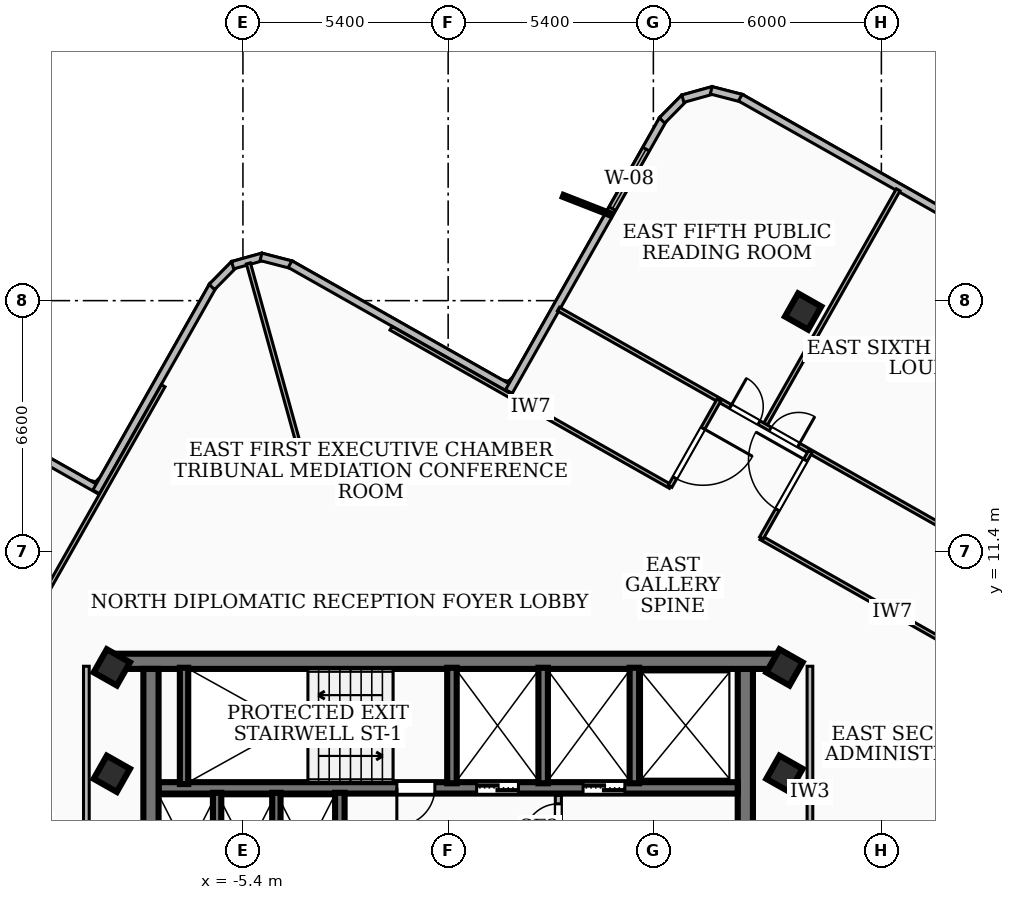
"""IFC4 building model, lengths in metres.
Left out: names, types, materials, properties, quantities, classifications, styles, units other than length and angle.
Written with IfcOpenShell. Run it as: python <this file> out.ifc"""

import sys

from ifc_helpers import new_model, si_unit, direction, frame, frame_2d, origin, origin_2d, place, context, subcontext, project, spatial, rectangle, extrude, element, fill, save


model = new_model("IFC4")
c1 = context("Model", 3, precision=1e-05, world=origin(), true_north=direction((0.0, 1.0)))
c2 = subcontext(c1, "Body", "Model", "MODEL_VIEW")
j1 = project(units=[si_unit("LENGTHUNIT", "METRE"), si_unit("PLANEANGLEUNIT", "RADIAN")], contexts=[c1])
p1 = place(None, origin())
s1 = spatial("IfcSite", under=j1, at=p1, CompositionType="ELEMENT")
p2 = place(p1, origin())
s2 = spatial("IfcBuilding", under=s1, at=p2, CompositionType="ELEMENT")
p3 = place(p2, frame((0.0, 0.0, 278.28)))
s3 = spatial("IfcBuildingStorey", under=s2, at=p3, CompositionType="ELEMENT", Elevation=278.28)
p4 = place(p3, frame((-8.78, 8.51, 0.0), z_axis=(0.0, 0.0, 1.0), x_axis=(1.0, 0.0, 0.0)))
e1 = element("IfcWall", 1, at=p4, inside=s3, PredefinedType="SHEAR", context=c2, shape_type="SweptSolid", body=[
    extrude(rectangle(XDim=17.56, YDim=0.4, at=frame_2d((8.78, 0.0))), origin(), (0.0, 0.0, 1.0), 3.16),
])
for number, where, z_axis, x_axis in (
    (2, (-7.82, 1.95, 0.0), (0.0, 0.0, 1.0), (0.0, 1.0, 0.0)),
    (3, (7.82, 8.31, 0.0), (0.0, 0.0, 1.0), (0.0, -1.0, 0.0)),
):
    element("IfcWall", number, at=place(p3, frame(where, z_axis=z_axis, x_axis=x_axis)), inside=s3, PredefinedType="SHEAR", context=c2, shape_type="SweptSolid", body=[
        extrude(rectangle(XDim=6.36, YDim=0.4, at=frame_2d((3.18, 0.0))), origin(), (0.0, 0.0, 1.0), 3.16),
    ])
p5 = place(p3, frame((7.62, 5.18, 0.0), z_axis=(0.0, 0.0, 1.0), x_axis=(-1.0, 0.0, 0.0)))
e4 = element("IfcWall", 4, at=p5, inside=s3, PredefinedType="SOLIDWALL", context=c2, shape_type="SweptSolid", body=[
    extrude(rectangle(XDim=15.24, YDim=0.3, at=frame_2d((7.62, 0.0))), origin(), (0.0, 0.0, 1.0), 3.16),
])
p6 = place(p5, frame((5.77, 0.0, 0.0)))
e5 = element("IfcOpeningElement", 5, at=p6, cuts=e4, PredefinedType="OPENING", context=c2, shape_type="SweptSolid", body=[
    extrude(rectangle(XDim=1.1, YDim=2.15, at=frame_2d((0.55, 1.075))), frame((0.0, 0.16, 0.0), z_axis=(0.0, -1.0, 0.0), x_axis=(1.0, 0.0, 0.0)), (0.0, 0.0, 1.0), 0.32),
])
p7 = place(p5, frame((2.97, 0.0, 0.0)))
e6 = element("IfcOpeningElement", 6, at=p7, cuts=e4, PredefinedType="OPENING", context=c2, shape_type="SweptSolid", body=[
    extrude(rectangle(XDim=1.1, YDim=2.15, at=frame_2d((0.55, 1.075))), frame((0.0, 0.16, 0.0), z_axis=(0.0, -1.0, 0.0), x_axis=(1.0, 0.0, 0.0)), (0.0, 0.0, 1.0), 0.32),
])
p8 = place(p5, frame((7.97, 0.0, 0.0)))
e7 = element("IfcOpeningElement", 7, at=p8, cuts=e4, PredefinedType="OPENING", context=c2, shape_type="SweptSolid", body=[
    extrude(rectangle(XDim=1.0, YDim=2.1, at=frame_2d((0.5, 1.05))), frame((0.0, 0.16, 0.0), z_axis=(0.0, -1.0, 0.0), x_axis=(1.0, 0.0, 0.0)), (0.0, 0.0, 1.0), 0.32),
])
p9 = place(p3, frame((-6.95, 5.28, 0.0), z_axis=(0.0, 0.0, 1.0), x_axis=(0.0, 1.0, 0.0)))
e8 = element("IfcWall", 8, at=p9, inside=s3, PredefinedType="SOLIDWALL", context=c2, shape_type="SweptSolid", body=[
    extrude(rectangle(XDim=3.06, YDim=0.22, at=frame_2d((1.53, 0.0))), origin(), (0.0, 0.0, 1.0), 3.16),
])
for number, where, z_axis, x_axis in (
    (9, (0.1, 5.3, 0.0), (0.0, 0.0, 1.0), (0.0, 1.0, 0.0)),
    (10, (2.5, 5.3, 0.0), (0.0, 0.0, 1.0), (0.0, 1.0, 0.0)),
    (11, (4.9, 5.3, 0.0), (0.0, 0.0, 1.0), (0.0, 1.0, 0.0)),
):
    element("IfcWall", number, at=place(p3, frame(where, z_axis=z_axis, x_axis=x_axis)), inside=s3, PredefinedType="SOLIDWALL", context=c2, shape_type="SweptSolid", body=[
        extrude(rectangle(XDim=3.04, YDim=0.25, at=frame_2d((1.52, 0.0))), origin(), (0.0, 0.0, 1.0), 3.16),
    ])
p10 = place(p3, frame((-2.85, 1.98, 0.0), z_axis=(0.0, 0.0, 1.0), x_axis=(0.0, 1.0, 0.0)))
e12 = element("IfcWall", 12, at=p10, inside=s3, PredefinedType="SOLIDWALL", context=c2, shape_type="SweptSolid", body=[
    extrude(rectangle(XDim=3.07, YDim=0.25, at=frame_2d((1.535, 0.0))), origin(), (0.0, 0.0, 1.0), 3.16),
])
for number, where, z_axis, x_axis in (
    (13, (-6.08, 1.98, 0.0), (0.0, 0.0, 1.0), (0.0, 1.0, 0.0)),
    (14, (-4.52, 1.98, 0.0), (0.0, 0.0, 1.0), (0.0, 1.0, 0.0)),
):
    element("IfcWall", number, at=place(p3, frame(where, z_axis=z_axis, x_axis=x_axis)), inside=s3, PredefinedType="SOLIDWALL", context=c2, shape_type="SweptSolid", body=[
        extrude(rectangle(XDim=3.07, YDim=0.22, at=frame_2d((1.535, 0.0))), origin(), (0.0, 0.0, 1.0), 3.16),
    ])
for number, where, z_axis, x_axis in (
    (15, (-8.85, 5.55, 0.0), (0.0, 0.0, 1.0), (0.493, 0.87, 0.0)),
    (16, (8.85, 5.55, 0.0), (0.0, 0.0, 1.0), (0.493, 0.87, 0.0)),
    (17, (-8.85, 8.35, 0.0), (0.0, 0.0, 1.0), (0.493, 0.87, 0.0)),
    (18, (8.85, 8.35, 0.0), (0.0, 0.0, 1.0), (0.493, 0.87, 0.0)),
    (19, (9.341, 17.714, 0.0), (0.0, 0.0, 1.0), (0.493, 0.87, 0.0)),
):
    element("IfcColumn", number, at=place(p3, frame(where, z_axis=z_axis, x_axis=x_axis)), inside=s3, PredefinedType="COLUMN", context=c2, shape_type="SweptSolid", body=[
        extrude(rectangle(XDim=0.7, YDim=0.7, at=origin_2d()), origin(), (0.0, 0.0, 1.0), 3.42),
    ])
p11 = place(p3, frame((-12.323, 14.792, 0.0), z_axis=(0.0, 0.0, 1.0), x_axis=(0.870412972764, -0.492322309918, 0.0)))
e20 = element("IfcWall", 20, at=p11, inside=s3, PredefinedType="SOLIDWALL", context=c2, shape_type="SweptSolid", body=[
    extrude(rectangle(XDim=3.642, YDim=0.2, at=frame_2d((1.821, 0.0))), origin(), (0.0, 0.0, 1.0), 3.16),
])
p12 = place(p3, frame((-9.262, 12.968, 0.0), z_axis=(0.0, 0.0, 1.0), x_axis=(0.492583125855, 0.87026539867, 0.0)))
e21 = element("IfcWall", 21, at=p12, inside=s3, PredefinedType="SOLIDWALL", context=c2, shape_type="SweptSolid", body=[
    extrude(rectangle(XDim=6.24, YDim=0.2, at=frame_2d((3.12, 0.0))), origin(), (0.0, 0.0, 1.0), 3.16),
])
p13 = place(p3, frame((-6.218, 18.359, 0.0), z_axis=(0.0, 0.0, 1.0), x_axis=(0.701706468749, 0.712466161804, 0.0)))
e22 = element("IfcWall", 22, at=p13, inside=s3, PredefinedType="SOLIDWALL", context=c2, shape_type="SweptSolid", body=[
    extrude(rectangle(XDim=0.84, YDim=0.2, at=frame_2d((0.42, 0.0))), origin(), (0.0, 0.0, 1.0), 3.16),
])
p14 = place(p3, frame((-5.671, 18.932, 0.0), z_axis=(0.0, 0.0, 1.0), x_axis=(0.963313924885, 0.268377126675, 0.0)))
e23 = element("IfcWall", 23, at=p14, inside=s3, PredefinedType="SOLIDWALL", context=c2, shape_type="SweptSolid", body=[
    extrude(rectangle(XDim=0.824, YDim=0.2, at=frame_2d((0.412, 0.0))), origin(), (0.0, 0.0, 1.0), 3.16),
])
p15 = place(p3, frame((-4.925, 19.152, 0.0), z_axis=(0.0, 0.0, 1.0), x_axis=(0.968015248239, -0.250891369276, 0.0)))
e24 = element("IfcWall", 24, at=p15, inside=s3, PredefinedType="SOLIDWALL", context=c2, shape_type="SweptSolid", body=[
    extrude(rectangle(XDim=0.838, YDim=0.2, at=frame_2d((0.419, 0.0))), origin(), (0.0, 0.0, 1.0), 3.16),
])
p16 = place(p3, frame((-4.16, 18.96, 0.0), z_axis=(0.0, 0.0, 1.0), x_axis=(0.870345588147, -0.492441425139, 0.0)))
e25 = element("IfcWall", 25, at=p16, inside=s3, PredefinedType="SOLIDWALL", context=c2, shape_type="SweptSolid", body=[
    extrude(rectangle(XDim=6.742, YDim=0.2, at=frame_2d((3.371, 0.0))), origin(), (0.0, 0.0, 1.0), 3.16),
])
p17 = place(p3, frame((1.599, 15.609, 0.0), z_axis=(0.0, 0.0, 1.0), x_axis=(0.492609649108, 0.870250385582, 0.0)))
e26 = element("IfcWall", 26, at=p17, inside=s3, PredefinedType="SOLIDWALL", context=c2, shape_type="SweptSolid", body=[
    extrude(rectangle(XDim=8.241, YDim=0.2, at=frame_2d((4.121, 0.0))), origin(), (0.0, 0.0, 1.0), 3.16),
])
p18 = place(p17, frame((5.528, 0.0, 0.85)))
e27 = element("IfcOpeningElement", 27, at=p18, cuts=e26, PredefinedType="OPENING", context=c2, shape_type="SweptSolid", body=[
    extrude(rectangle(XDim=1.8, YDim=1.8, at=frame_2d((0.9, 0.9))), frame((0.0, 0.11, 0.0), z_axis=(0.0, -1.0, 0.0), x_axis=(1.0, 0.0, 0.0)), (0.0, 0.0, 1.0), 0.22),
])
p19 = place(p3, frame((5.629, 22.741, 0.0), z_axis=(0.0, 0.0, 1.0), x_axis=(0.701706468749, 0.712466161804, 0.0)))
e28 = element("IfcWall", 28, at=p19, inside=s3, PredefinedType="SOLIDWALL", context=c2, shape_type="SweptSolid", body=[
    extrude(rectangle(XDim=0.84, YDim=0.2, at=frame_2d((0.42, 0.0))), origin(), (0.0, 0.0, 1.0), 3.16),
])
p20 = place(p3, frame((6.176, 23.314, 0.0), z_axis=(0.0, 0.0, 1.0), x_axis=(0.963390474438, 0.268102207677, 0.0)))
e29 = element("IfcWall", 29, at=p20, inside=s3, PredefinedType="SOLIDWALL", context=c2, shape_type="SweptSolid", body=[
    extrude(rectangle(XDim=0.824, YDim=0.2, at=frame_2d((0.412, 0.0))), origin(), (0.0, 0.0, 1.0), 3.16),
])
p21 = place(p3, frame((6.922, 23.534, 0.0), z_axis=(0.0, 0.0, 1.0), x_axis=(0.968067673617, -0.250689009127, 0.0)))
e30 = element("IfcWall", 30, at=p21, inside=s3, PredefinedType="SOLIDWALL", context=c2, shape_type="SweptSolid", body=[
    extrude(rectangle(XDim=0.838, YDim=0.2, at=frame_2d((0.419, 0.0))), origin(), (0.0, 0.0, 1.0), 3.16),
])
p22 = place(p3, frame((7.687, 23.342, 0.0), z_axis=(0.0, 0.0, 1.0), x_axis=(0.870205552017, -0.49268884424, 0.0)))
e31 = element("IfcWall", 31, at=p22, inside=s3, PredefinedType="SOLIDWALL", context=c2, shape_type="SweptSolid", body=[
    extrude(rectangle(XDim=10.124, YDim=0.2, at=frame_2d((5.062, 0.0))), origin(), (0.0, 0.0, 1.0), 3.16),
])
p23 = place(p22, frame((6.997, 0.0, 0.85)))
e32 = element("IfcOpeningElement", 32, at=p23, cuts=e31, PredefinedType="OPENING", context=c2, shape_type="SweptSolid", body=[
    extrude(rectangle(XDim=1.8, YDim=1.6, at=frame_2d((0.9, 0.8))), frame((0.0, 0.11, 0.0), z_axis=(0.0, -1.0, 0.0), x_axis=(1.0, 0.0, 0.0)), (0.0, 0.0, 1.0), 0.22),
])
p24 = place(p3, frame((2.9, 2.04, 0.0), z_axis=(0.0, 0.0, 1.0), x_axis=(0.0, 1.0, 0.0)))
e33 = element("IfcWall", 33, at=p24, inside=s3, PredefinedType="PARTITIONING", context=c2, shape_type="SweptSolid", body=[
    extrude(rectangle(XDim=2.94, YDim=0.16, at=frame_2d((1.47, 0.0))), origin(), (0.0, 0.0, 1.0), 2.39),
])
p25 = place(p24, frame((1.82, 0.0, 0.0)))
e34 = element("IfcOpeningElement", 34, at=p25, cuts=e33, PredefinedType="OPENING", context=c2, shape_type="SweptSolid", body=[
    extrude(rectangle(XDim=0.9, YDim=2.06, at=frame_2d((0.45, 1.03))), frame((0.0, 0.09, 0.0), z_axis=(0.0, -1.0, 0.0), x_axis=(1.0, 0.0, 0.0)), (0.0, 0.0, 1.0), 0.18),
])
p26 = place(p3, frame((-9.52, 1.75, 0.0), z_axis=(0.0, 0.0, 1.0), x_axis=(0.0, 1.0, 0.0)))
e35 = element("IfcWall", 35, at=p26, inside=s3, PredefinedType="PARTITIONING", context=c2, shape_type="SweptSolid", body=[
    extrude(rectangle(XDim=6.63, YDim=0.15, at=frame_2d((3.315, 0.0))), origin(), (0.0, 0.0, 1.0), 2.53),
])
p27 = place(p3, frame((9.52, 1.75, 0.0), z_axis=(0.0, 0.0, 1.0), x_axis=(0.0, 1.0, 0.0)))
e36 = element("IfcWall", 36, at=p27, inside=s3, PredefinedType="PARTITIONING", context=c2, shape_type="SweptSolid", body=[
    extrude(rectangle(XDim=6.63, YDim=0.15, at=frame_2d((3.315, 0.0))), origin(), (0.0, 0.0, 1.0), 3.16),
])
p28 = place(p3, frame((-3.75, 13.54, 0.0), z_axis=(0.0, 0.0, 1.0), x_axis=(-0.266822842302, 0.963745594452, 0.0)))
e37 = element("IfcWall", 37, at=p28, inside=s3, PredefinedType="PARTITIONING", context=c2, shape_type="SweptSolid", body=[
    extrude(rectangle(XDim=5.645, YDim=0.11, at=frame_2d((2.822, 0.0))), origin(), (0.0, 0.0, 1.0), 3.16),
])
p29 = place(p3, frame((11.3, 3.13, 0.0), z_axis=(0.0, 0.0, 1.0), x_axis=(0.963747113025, 0.26681735726, 0.0)))
e38 = element("IfcWall", 38, at=p29, inside=s3, PredefinedType="PARTITIONING", context=c2, shape_type="SweptSolid", body=[
    extrude(rectangle(XDim=7.969, YDim=0.11, at=frame_2d((3.984, 0.0))), origin(), (0.0, 0.0, 1.0), 3.16),
])
p30 = place(p3, frame((5.849, 13.11, 0.0), z_axis=(0.0, 0.0, 1.0), x_axis=(-0.870169207172, 0.49275303235, 0.0)))
e39 = element("IfcWall", 39, at=p30, inside=s3, PredefinedType="PARTITIONING", context=c2, shape_type="SweptSolid", body=[
    extrude(rectangle(XDim=8.45, YDim=0.11, at=frame_2d((4.225, 0.0))), origin(), (0.0, 0.0, 1.0), 3.16),
])
p31 = place(p3, frame((15.152, 7.843, 0.0), z_axis=(0.0, 0.0, 1.0), x_axis=(-0.87023152106, 0.492642973921, 0.0)))
e40 = element("IfcWall", 40, at=p31, inside=s3, PredefinedType="PARTITIONING", context=c2, shape_type="SweptSolid", body=[
    extrude(rectangle(XDim=7.951, YDim=0.11, at=frame_2d((3.976, 0.0))), origin(), (0.0, 0.0, 1.0), 2.53),
])
p32 = place(p3, frame((7.126, 15.386, 0.0), z_axis=(0.0, 0.0, 1.0), x_axis=(-0.492719860856, -0.870187990447, 0.0)))
e41 = element("IfcWall", 41, at=p32, inside=s3, PredefinedType="PARTITIONING", context=c2, shape_type="SweptSolid", body=[
    extrude(rectangle(XDim=2.61, YDim=0.11, at=frame_2d((1.305, 0.0))), origin(), (0.0, 0.0, 1.0), 3.16),
])
p33 = place(p32, frame((0.855, 0.0, 0.0)))
e42 = element("IfcOpeningElement", 42, at=p33, cuts=e41, PredefinedType="OPENING", context=c2, shape_type="SweptSolid", body=[
    extrude(rectangle(XDim=1.5, YDim=2.12, at=frame_2d((0.75, 1.06))), frame((0.0, 0.065, 0.0), z_axis=(0.0, -1.0, 0.0), x_axis=(1.0, 0.0, 0.0)), (0.0, 0.0, 1.0), 0.13),
])
p34 = place(p3, frame((8.242, 11.755, 0.0), z_axis=(0.0, 0.0, 1.0), x_axis=(0.492790693409, 0.870147879667, 0.0)))
e43 = element("IfcWall", 43, at=p34, inside=s3, PredefinedType="PARTITIONING", context=c2, shape_type="SweptSolid", body=[
    extrude(rectangle(XDim=2.61, YDim=0.11, at=frame_2d((1.305, 0.0))), origin(), (0.0, 0.0, 1.0), 2.53),
])
p35 = place(p34, frame((0.855, 0.0, 0.0)))
e44 = element("IfcOpeningElement", 44, at=p35, cuts=e43, PredefinedType="OPENING", context=c2, shape_type="SweptSolid", body=[
    extrude(rectangle(XDim=1.5, YDim=2.12, at=frame_2d((0.75, 1.06))), frame((0.0, 0.065, 0.0), z_axis=(0.0, -1.0, 0.0), x_axis=(1.0, 0.0, 0.0)), (0.0, 0.0, 1.0), 0.13),
])
p36 = place(p3, frame((8.357, 14.758, 0.0), z_axis=(0.0, 0.0, 1.0), x_axis=(0.492600685366, 0.870255459493, 0.0)))
e45 = element("IfcWall", 45, at=p36, inside=s3, PredefinedType="PARTITIONING", context=c2, shape_type="SweptSolid", body=[
    extrude(rectangle(XDim=7.075, YDim=0.11, at=frame_2d((3.538, 0.0))), origin(), (0.0, 0.0, 1.0), 2.53),
])
p37 = place(p3, frame((2.902, 17.778, 0.0), z_axis=(0.0, 0.0, 1.0), x_axis=(0.870194117035, -0.492709040588, 0.0)))
e46 = element("IfcWall", 46, at=p37, inside=s3, PredefinedType="PARTITIONING", context=c2, shape_type="SweptSolid", body=[
    extrude(rectangle(XDim=12.969, YDim=0.11, at=frame_2d((6.485, 0.0))), origin(), (0.0, 0.0, 1.0), 2.53),
])
p38 = place(p37, frame((6.405, 0.0, 0.0)))
e47 = element("IfcOpeningElement", 47, at=p38, cuts=e46, PredefinedType="OPENING", context=c2, shape_type="SweptSolid", body=[
    extrude(rectangle(XDim=0.86, YDim=2.04, at=frame_2d((0.43, 1.02))), frame((0.0, 0.065, 0.0), z_axis=(0.0, -1.0, 0.0), x_axis=(1.0, 0.0, 0.0)), (0.0, 0.0, 1.0), 0.13),
])
p39 = place(p37, frame((5.205, 0.0, 0.0)))
e48 = element("IfcOpeningElement", 48, at=p39, cuts=e46, PredefinedType="OPENING", context=c2, shape_type="SweptSolid", body=[
    extrude(rectangle(XDim=0.86, YDim=2.04, at=frame_2d((0.43, 1.02))), frame((0.0, 0.065, 0.0), z_axis=(0.0, -1.0, 0.0), x_axis=(1.0, 0.0, 0.0)), (0.0, 0.0, 1.0), 0.13),
])
p40 = place(p3, frame((-17.619, -2.113, 0.0), z_axis=(0.0, 0.0, 1.0), x_axis=(0.492746831558, 0.870172718482, 0.0)))
e49 = element("IfcWall", 49, at=p40, inside=s3, PredefinedType="PARTITIONING", context=c2, shape_type="SweptSolid", body=[
    extrude(rectangle(XDim=20.54, YDim=0.11, at=frame_2d((10.27, 0.0))), origin(), (0.0, 0.0, 1.0), 2.53),
])
p41 = place(p40, frame((11.36, 0.0, 0.0)))
e50 = element("IfcOpeningElement", 50, at=p41, cuts=e49, PredefinedType="OPENING", context=c2, shape_type="SweptSolid", body=[
    extrude(rectangle(XDim=0.86, YDim=2.04, at=frame_2d((0.43, 1.02))), frame((0.0, 0.065, 0.0), z_axis=(0.0, -1.0, 0.0), x_axis=(1.0, 0.0, 0.0)), (0.0, 0.0, 1.0), 0.13),
])
p42 = place(p40, frame((9.92, 0.0, 0.0)))
e51 = element("IfcOpeningElement", 51, at=p42, cuts=e49, PredefinedType="OPENING", context=c2, shape_type="SweptSolid", body=[
    extrude(rectangle(XDim=0.86, YDim=2.04, at=frame_2d((0.43, 1.02))), frame((0.0, 0.065, 0.0), z_axis=(0.0, -1.0, 0.0), x_axis=(1.0, 0.0, 0.0)), (0.0, 0.0, 1.0), 0.13),
])
p43 = place(p18, origin())
e52 = element("IfcWindow", 52, at=p43, inside=s3, PartitioningType="SINGLE_PANEL", PredefinedType="WINDOW", context=c2, shape_type="SweptSolid", body=[
    extrude(rectangle(XDim=1.8, YDim=1.8, at=frame_2d((0.9, 0.9))), frame((0.0, 0.03, 0.0), z_axis=(0.0, -1.0, 0.0), x_axis=(1.0, 0.0, 0.0)), (0.0, 0.0, 1.0), 0.06),
])
fill(e27, e52)
p44 = place(p6, origin())
e53 = element("IfcDoor", 53, at=p44, inside=s3, OperationType="DOUBLE_DOOR_SLIDING", PredefinedType="DOOR", context=c2, shape_type="SweptSolid", body=[
    extrude(rectangle(XDim=1.1, YDim=2.15, at=frame_2d((0.55, 1.075))), frame((0.0, 0.025, 0.0), z_axis=(0.0, -1.0, 0.0), x_axis=(1.0, 0.0, 0.0)), (0.0, 0.0, 1.0), 0.05),
])
fill(e5, e53)
p45 = place(p7, origin())
e54 = element("IfcDoor", 54, at=p45, inside=s3, OperationType="DOUBLE_DOOR_SLIDING", PredefinedType="DOOR", context=c2, shape_type="SweptSolid", body=[
    extrude(rectangle(XDim=1.1, YDim=2.15, at=frame_2d((0.55, 1.075))), frame((0.0, 0.025, 0.0), z_axis=(0.0, -1.0, 0.0), x_axis=(1.0, 0.0, 0.0)), (0.0, 0.0, 1.0), 0.05),
])
fill(e6, e54)
p46 = place(p8, origin())
e55 = element("IfcDoor", 55, at=p46, inside=s3, OperationType="SINGLE_SWING_RIGHT", PredefinedType="DOOR", context=c2, shape_type="SweptSolid", body=[
    extrude(rectangle(XDim=1.0, YDim=2.1, at=frame_2d((0.5, 1.05))), frame((0.0, 0.025, 0.0), z_axis=(0.0, -1.0, 0.0), x_axis=(1.0, 0.0, 0.0)), (0.0, 0.0, 1.0), 0.05),
])
fill(e7, e55)
p47 = place(p25, origin())
e56 = element("IfcDoor", 56, at=p47, inside=s3, OperationType="SINGLE_SWING_LEFT", PredefinedType="DOOR", context=c2, shape_type="SweptSolid", body=[
    extrude(rectangle(XDim=0.9, YDim=2.06, at=frame_2d((0.45, 1.03))), frame((0.0, 0.025, 0.0), z_axis=(0.0, -1.0, 0.0), x_axis=(1.0, 0.0, 0.0)), (0.0, 0.0, 1.0), 0.05),
])
fill(e34, e56)
p48 = place(p33, origin())
e57 = element("IfcDoor", 57, at=p48, inside=s3, OperationType="SINGLE_SWING_LEFT", PredefinedType="DOOR", context=c2, shape_type="SweptSolid", body=[
    extrude(rectangle(XDim=1.5, YDim=2.12, at=frame_2d((0.75, 1.06))), frame((0.0, 0.025, 0.0), z_axis=(0.0, -1.0, 0.0), x_axis=(1.0, 0.0, 0.0)), (0.0, 0.0, 1.0), 0.05),
])
fill(e42, e57)
p49 = place(p35, origin())
e58 = element("IfcDoor", 58, at=p49, inside=s3, OperationType="SINGLE_SWING_RIGHT", PredefinedType="DOOR", context=c2, shape_type="SweptSolid", body=[
    extrude(rectangle(XDim=1.5, YDim=2.12, at=frame_2d((0.75, 1.06))), frame((0.0, 0.025, 0.0), z_axis=(0.0, -1.0, 0.0), x_axis=(1.0, 0.0, 0.0)), (0.0, 0.0, 1.0), 0.05),
])
fill(e44, e58)
p50 = place(p38, origin())
e59 = element("IfcDoor", 59, at=p50, inside=s3, OperationType="SINGLE_SWING_RIGHT", PredefinedType="DOOR", context=c2, shape_type="SweptSolid", body=[
    extrude(rectangle(XDim=0.86, YDim=2.04, at=frame_2d((0.43, 1.02))), frame((0.0, 0.025, 0.0), z_axis=(0.0, -1.0, 0.0), x_axis=(1.0, 0.0, 0.0)), (0.0, 0.0, 1.0), 0.05),
])
fill(e47, e59)
p51 = place(p39, origin())
e60 = element("IfcDoor", 60, at=p51, inside=s3, OperationType="SINGLE_SWING_LEFT", PredefinedType="DOOR", context=c2, shape_type="SweptSolid", body=[
    extrude(rectangle(XDim=0.86, YDim=2.04, at=frame_2d((0.43, 1.02))), frame((0.0, 0.025, 0.0), z_axis=(0.0, -1.0, 0.0), x_axis=(1.0, 0.0, 0.0)), (0.0, 0.0, 1.0), 0.05),
])
fill(e48, e60)
save(model, sys.argv[1])
